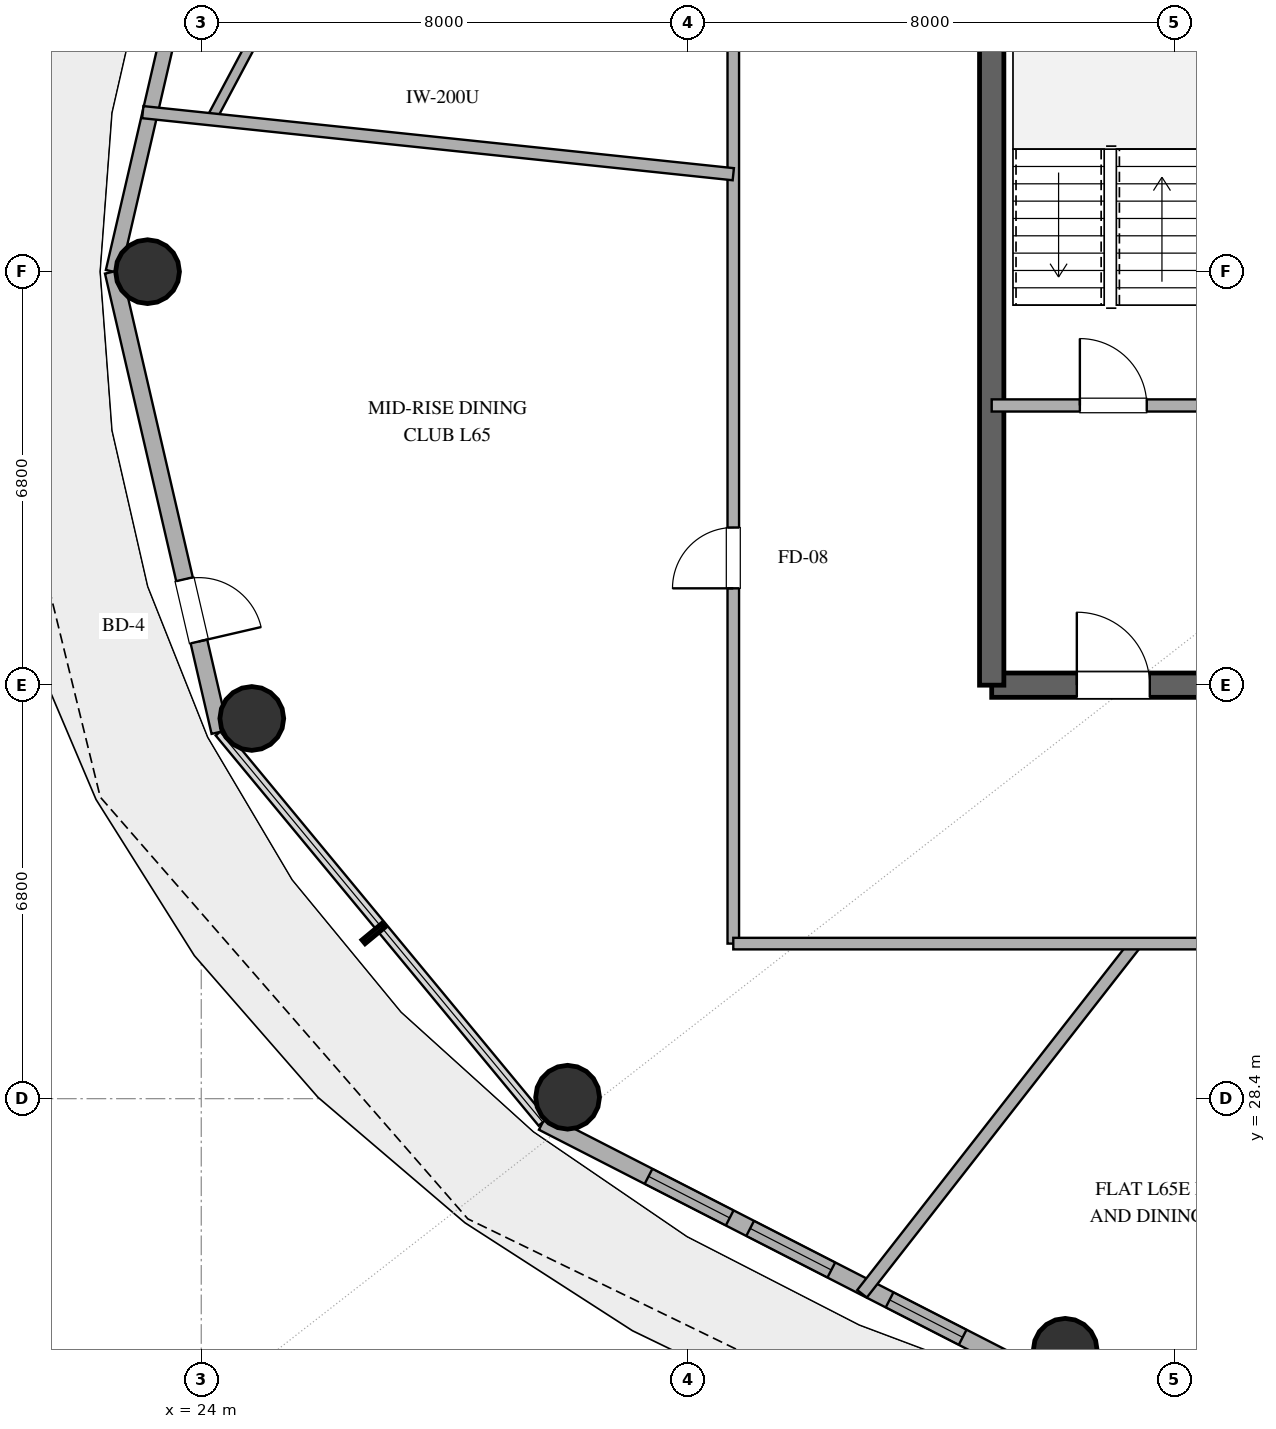
"""IFC4 building model, lengths in metres.
Left out: names, types, materials, properties, quantities, classifications, styles, units other than length and angle.
Written with IfcOpenShell. Run it as: python <this file> out.ifc"""

import sys

from ifc_helpers import new_model, si_unit, direction, frame, frame_2d, origin, origin_2d, place, context, subcontext, project, spatial, rectangle, hollow_circle, extrude, element, fill, save


model = new_model("IFC4")
c1 = context("Model", 3, precision=1e-05, world=origin(), true_north=direction((0.0, 1.0)))
c2 = subcontext(c1, "Body", "Model", "MODEL_VIEW")
j1 = project(units=[si_unit("LENGTHUNIT", "METRE"), si_unit("PLANEANGLEUNIT", "RADIAN")], contexts=[c1])
p1 = place(None, origin())
s1 = spatial("IfcSite", under=j1, at=p1, CompositionType="ELEMENT")
p2 = place(p1, origin())
s2 = spatial("IfcBuilding", under=s1, at=p2, CompositionType="ELEMENT")
p3 = place(p2, frame((0.0, 0.0, 253.2)))
s3 = spatial("IfcBuildingStorey", under=s2, at=p3, CompositionType="ELEMENT", Elevation=253.2)
p4 = place(p3, frame((37.0, 35.2, 0.0), z_axis=(0.0, 0.0, 1.0), x_axis=(1.0, 0.0, 0.0)))
e1 = element("IfcWall", 1, at=p4, inside=s3, PredefinedType="SHEAR", context=c2, shape_type="SweptSolid", body=[
    extrude(rectangle(XDim=4.0, YDim=0.4, at=frame_2d((2.0, 0.0))), origin(), (0.0, 0.0, 1.0), 3.25),
])
p5 = place(p4, frame((1.4, 0.0, 0.0)))
e2 = element("IfcOpeningElement", 2, at=p5, cuts=e1, PredefinedType="OPENING", context=c2, shape_type="SweptSolid", body=[
    extrude(rectangle(XDim=1.2, YDim=2.15, at=frame_2d((0.6, 1.075))), frame((0.0, 0.21, 0.0), z_axis=(0.0, -1.0, 0.0), x_axis=(1.0, 0.0, 0.0)), (0.0, 0.0, 1.0), 0.42),
])
p6 = place(p3, frame((37.0, 35.2, 0.0), z_axis=(0.0, 0.0, 1.0), x_axis=(0.0, 1.0, 0.0)))
e3 = element("IfcWall", 3, at=p6, inside=s3, PredefinedType="SHEAR", context=c2, shape_type="SweptSolid", body=[
    extrude(rectangle(XDim=13.6, YDim=0.4, at=frame_2d((6.8, 0.0))), origin(), (0.0, 0.0, 1.0), 3.25),
])
for number, where, z_axis, x_axis in (
    (4, (23.117, 42.0, 0.0), (0.0, 0.0, 1.0), (1.0, 0.0, 0.0)),
    (5, (24.831, 34.653, 0.0), (0.0, 0.0, 1.0), (1.0, 0.0, 0.0)),
    (6, (30.025, 28.424, 0.0), (0.0, 0.0, 1.0), (1.0, 0.0, 0.0)),
    (7, (38.209, 24.261, 0.0), (0.0, 0.0, 1.0), (1.0, 0.0, 0.0)),
):
    element("IfcColumn", number, at=place(p3, frame(where, z_axis=z_axis, x_axis=x_axis)), inside=s3, PredefinedType="COLUMN", context=c2, shape_type="SweptSolid", body=[
        extrude(hollow_circle(Radius=0.525, WallThickness=0.028, at=origin_2d()), origin(), (0.0, 0.0, 1.0), 3.25),
    ])
p7 = place(p3, frame((24.306, 49.57, 0.0), z_axis=(0.0, 0.0, 1.0), x_axis=(-0.225635078214, -0.974211892495, 0.0)))
e8 = element("IfcWall", 8, at=p7, inside=s3, PredefinedType="SOLIDWALL", context=c2, shape_type="SweptSolid", body=[
    extrude(rectangle(XDim=7.77, YDim=0.25, at=frame_2d((3.885, 0.0))), origin(), (0.0, 0.0, 1.0), 3.25),
])
p8 = place(p3, frame((22.553, 42.0, 0.0), z_axis=(0.0, 0.0, 1.0), x_axis=(0.225635078214, -0.974211892495, 0.0)))
e9 = element("IfcWall", 9, at=p8, inside=s3, PredefinedType="SOLIDWALL", context=c2, shape_type="SweptSolid", body=[
    extrude(rectangle(XDim=7.77, YDim=0.28, at=frame_2d((3.885, 0.0))), origin(), (0.0, 0.0, 1.0), 3.25),
])
p9 = place(p8, frame((5.192, 0.0, 0.0)))
e10 = element("IfcOpeningElement", 10, at=p9, cuts=e9, PredefinedType="OPENING", context=c2, shape_type="SweptSolid", body=[
    extrude(rectangle(XDim=1.05, YDim=2.2, at=frame_2d((0.525, 1.1))), frame((0.0, 0.15, 0.0), z_axis=(0.0, -1.0, 0.0), x_axis=(1.0, 0.0, 0.0)), (0.0, 0.0, 1.0), 0.3),
])
p10 = place(p3, frame((29.617, 28.013, 0.0), z_axis=(0.0, 0.0, 1.0), x_axis=(0.890007394051, -0.455946091699, 0.0)))
e11 = element("IfcWall", 11, at=p10, inside=s3, PredefinedType="SOLIDWALL", context=c2, shape_type="SweptSolid", body=[
    extrude(rectangle(XDim=9.404, YDim=0.28, at=frame_2d((4.702, 0.0))), origin(), (0.0, 0.0, 1.0), 3.25),
])
p11 = place(p10, frame((1.954, 0.0, 0.85)))
e12 = element("IfcOpeningElement", 12, at=p11, cuts=e11, PredefinedType="OPENING", context=c2, shape_type="SweptSolid", body=[
    extrude(rectangle(XDim=1.5, YDim=1.8, at=frame_2d((0.75, 0.9))), frame((0.0, 0.15, 0.0), z_axis=(0.0, -1.0, 0.0), x_axis=(1.0, 0.0, 0.0)), (0.0, 0.0, 1.0), 0.3),
])
p12 = place(p10, frame((3.831, 0.0, 0.85)))
e13 = element("IfcOpeningElement", 13, at=p12, cuts=e11, PredefinedType="OPENING", context=c2, shape_type="SweptSolid", body=[
    extrude(rectangle(XDim=1.5, YDim=1.8, at=frame_2d((0.75, 0.9))), frame((0.0, 0.15, 0.0), z_axis=(0.0, -1.0, 0.0), x_axis=(1.0, 0.0, 0.0)), (0.0, 0.0, 1.0), 0.3),
])
p13 = place(p10, frame((6.408, 0.0, 0.85)))
e14 = element("IfcOpeningElement", 14, at=p13, cuts=e11, PredefinedType="OPENING", context=c2, shape_type="SweptSolid", body=[
    extrude(rectangle(XDim=1.35, YDim=1.8, at=frame_2d((0.675, 0.9))), frame((0.0, 0.15, 0.0), z_axis=(0.0, -1.0, 0.0), x_axis=(1.0, 0.0, 0.0)), (0.0, 0.0, 1.0), 0.3),
])
p14 = place(p3, frame((37.0, 39.8, 0.0), z_axis=(0.0, 0.0, 1.0), x_axis=(1.0, 0.0, 0.0)))
e15 = element("IfcWall", 15, at=p14, inside=s3, PredefinedType="SOLIDWALL", context=c2, shape_type="SweptSolid", body=[
    extrude(rectangle(XDim=4.0, YDim=0.2, at=frame_2d((2.0, 0.0))), origin(), (0.0, 0.0, 1.0), 2.61),
])
p15 = place(p14, frame((1.45, 0.0, 0.0)))
e16 = element("IfcOpeningElement", 16, at=p15, cuts=e15, PredefinedType="OPENING", context=c2, shape_type="SweptSolid", body=[
    extrude(rectangle(XDim=1.1, YDim=2.15, at=frame_2d((0.55, 1.075))), frame((0.0, 0.11, 0.0), z_axis=(0.0, -1.0, 0.0), x_axis=(1.0, 0.0, 0.0)), (0.0, 0.0, 1.0), 0.22),
])
p16 = place(p3, frame((32.75, 30.95, 0.0), z_axis=(0.0, 0.0, 1.0), x_axis=(0.0, 1.0, 0.0)))
e17 = element("IfcWall", 17, at=p16, inside=s3, PredefinedType="PARTITIONING", context=c2, shape_type="SweptSolid", body=[
    extrude(rectangle(XDim=14.855, YDim=0.19, at=frame_2d((7.427, 0.0))), origin(), (0.0, 0.0, 1.0), 2.61),
])
p17 = place(p16, frame((5.843, 0.0, 0.0)))
e18 = element("IfcOpeningElement", 18, at=p17, cuts=e17, PredefinedType="OPENING", context=c2, shape_type="SweptSolid", body=[
    extrude(rectangle(XDim=1.0, YDim=2.2, at=frame_2d((0.5, 1.1))), frame((0.0, 0.105, 0.0), z_axis=(0.0, -1.0, 0.0), x_axis=(1.0, 0.0, 0.0)), (0.0, 0.0, 1.0), 0.21),
])
p18 = place(p3, frame((28.391, 52.444, 0.0), z_axis=(0.0, 0.0, 1.0), x_axis=(-0.470083782917, -0.882621797282, 0.0)))
e19 = element("IfcWall", 19, at=p18, inside=s3, PredefinedType="PLUMBINGWALL", context=c2, shape_type="SweptSolid", body=[
    extrude(rectangle(XDim=8.994, YDim=0.16, at=frame_2d((4.497, 0.0))), origin(), (0.0, 0.0, 1.0), 2.61),
])
p19 = place(p18, frame((2.247, 0.0, 0.0)))
e20 = element("IfcOpeningElement", 20, at=p19, cuts=e19, PredefinedType="OPENING", context=c2, shape_type="SweptSolid", body=[
    extrude(rectangle(XDim=0.9, YDim=2.1, at=frame_2d((0.45, 1.05))), frame((0.0, 0.09, 0.0), z_axis=(0.0, -1.0, 0.0), x_axis=(1.0, 0.0, 0.0)), (0.0, 0.0, 1.0), 0.18),
])
p20 = place(p3, frame((23.039, 44.624, 0.0), z_axis=(0.0, 0.0, 1.0), x_axis=(0.994521469813, -0.104532512074, 0.0)))
e21 = element("IfcWall", 21, at=p20, inside=s3, PredefinedType="PARTITIONING", context=c2, shape_type="SweptSolid", body=[
    extrude(rectangle(XDim=9.765, YDim=0.2, at=frame_2d((4.882, 0.0))), origin(), (0.0, 0.0, 1.0), 2.61),
])
p21 = place(p3, frame((39.367, 30.95, 0.0), z_axis=(0.0, 0.0, 1.0), x_axis=(-0.615657656631, -0.788013737083, 0.0)))
e22 = element("IfcWall", 22, at=p21, inside=s3, PredefinedType="PARTITIONING", context=c2, shape_type="SweptSolid", body=[
    extrude(rectangle(XDim=7.308, YDim=0.2, at=frame_2d((3.654, 0.0))), origin(), (0.0, 0.0, 1.0), 2.61),
])
p22 = place(p3, frame((50.438, 30.95, 0.0), z_axis=(0.0, 0.0, 1.0), x_axis=(-1.0, 0.0, 0.0)))
e23 = element("IfcWall", 23, at=p22, inside=s3, PredefinedType="PARTITIONING", context=c2, shape_type="SweptSolid", body=[
    extrude(rectangle(XDim=17.688, YDim=0.19, at=frame_2d((8.844, 0.0))), origin(), (0.0, 0.0, 1.0), 2.61),
])
p23 = place(p22, frame((7.036, 0.0, 0.0)))
e24 = element("IfcOpeningElement", 24, at=p23, cuts=e23, PredefinedType="OPENING", context=c2, shape_type="SweptSolid", body=[
    extrude(rectangle(XDim=1.0, YDim=2.2, at=frame_2d((0.5, 1.1))), frame((0.0, 0.105, 0.0), z_axis=(0.0, -1.0, 0.0), x_axis=(1.0, 0.0, 0.0)), (0.0, 0.0, 1.0), 0.21),
])
p24 = place(p9, origin())
e25 = element("IfcDoor", 25, at=p24, inside=s3, OperationType="SINGLE_SWING_RIGHT", PredefinedType="DOOR", context=c2, shape_type="SweptSolid", body=[
    extrude(rectangle(XDim=1.05, YDim=2.2, at=frame_2d((0.525, 1.1))), frame((0.0, 0.025, 0.0), z_axis=(0.0, -1.0, 0.0), x_axis=(1.0, 0.0, 0.0)), (0.0, 0.0, 1.0), 0.05),
])
fill(e10, e25)
p25 = place(p11, origin())
e26 = element("IfcWindow", 26, at=p25, inside=s3, PartitioningType="SINGLE_PANEL", PredefinedType="WINDOW", context=c2, shape_type="SweptSolid", body=[
    extrude(rectangle(XDim=1.5, YDim=1.8, at=frame_2d((0.75, 0.9))), frame((0.0, 0.03, 0.0), z_axis=(0.0, -1.0, 0.0), x_axis=(1.0, 0.0, 0.0)), (0.0, 0.0, 1.0), 0.06),
])
fill(e12, e26)
p26 = place(p12, origin())
e27 = element("IfcWindow", 27, at=p26, inside=s3, PartitioningType="SINGLE_PANEL", PredefinedType="WINDOW", context=c2, shape_type="SweptSolid", body=[
    extrude(rectangle(XDim=1.5, YDim=1.8, at=frame_2d((0.75, 0.9))), frame((0.0, 0.03, 0.0), z_axis=(0.0, -1.0, 0.0), x_axis=(1.0, 0.0, 0.0)), (0.0, 0.0, 1.0), 0.06),
])
fill(e13, e27)
p27 = place(p13, origin())
e28 = element("IfcWindow", 28, at=p27, inside=s3, PartitioningType="SINGLE_PANEL", PredefinedType="WINDOW", context=c2, shape_type="SweptSolid", body=[
    extrude(rectangle(XDim=1.35, YDim=1.8, at=frame_2d((0.675, 0.9))), frame((0.0, 0.03, 0.0), z_axis=(0.0, -1.0, 0.0), x_axis=(1.0, 0.0, 0.0)), (0.0, 0.0, 1.0), 0.06),
])
fill(e14, e28)
p28 = place(p5, origin())
e29 = element("IfcDoor", 29, at=p28, inside=s3, OperationType="SINGLE_SWING_LEFT", PredefinedType="DOOR", context=c2, shape_type="SweptSolid", body=[
    extrude(rectangle(XDim=1.2, YDim=2.15, at=frame_2d((0.6, 1.075))), frame((0.0, 0.025, 0.0), z_axis=(0.0, -1.0, 0.0), x_axis=(1.0, 0.0, 0.0)), (0.0, 0.0, 1.0), 0.05),
])
fill(e2, e29)
p29 = place(p15, origin())
e30 = element("IfcDoor", 30, at=p29, inside=s3, OperationType="SINGLE_SWING_LEFT", PredefinedType="DOOR", context=c2, shape_type="SweptSolid", body=[
    extrude(rectangle(XDim=1.1, YDim=2.15, at=frame_2d((0.55, 1.075))), frame((0.0, 0.025, 0.0), z_axis=(0.0, -1.0, 0.0), x_axis=(1.0, 0.0, 0.0)), (0.0, 0.0, 1.0), 0.05),
])
fill(e16, e30)
p30 = place(p17, origin())
e31 = element("IfcDoor", 31, at=p30, inside=s3, OperationType="SINGLE_SWING_LEFT", PredefinedType="DOOR", context=c2, shape_type="SweptSolid", body=[
    extrude(rectangle(XDim=1.0, YDim=2.2, at=frame_2d((0.5, 1.1))), frame((0.0, 0.025, 0.0), z_axis=(0.0, -1.0, 0.0), x_axis=(1.0, 0.0, 0.0)), (0.0, 0.0, 1.0), 0.05),
])
fill(e18, e31)
save(model, sys.argv[1])
